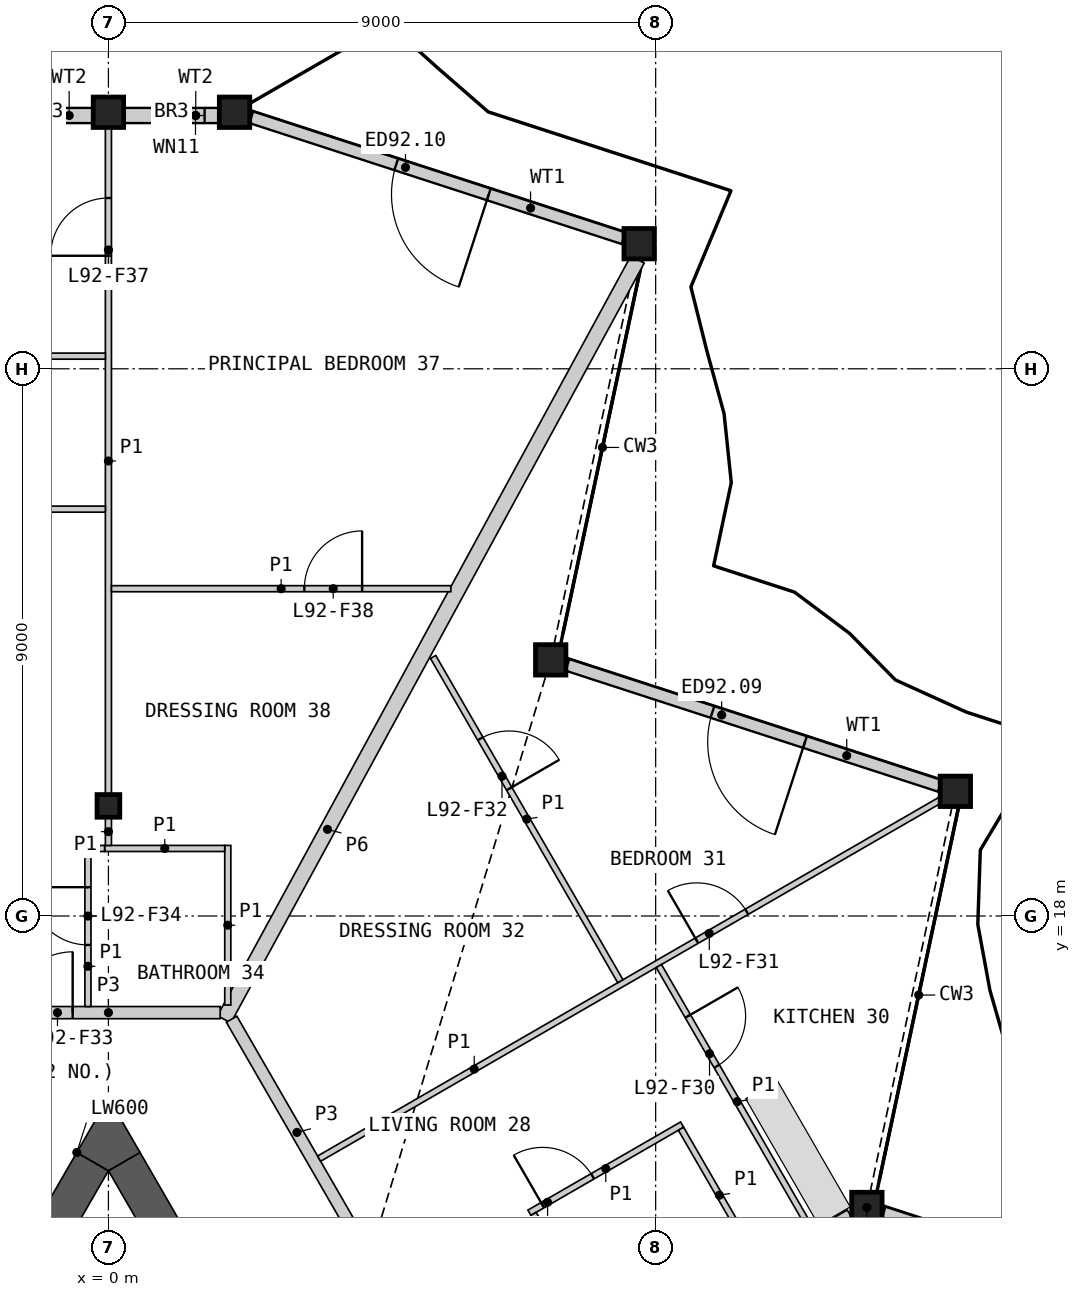
"""IFC4 building model, lengths in metres.
Left out: names, types, materials, properties, quantities, classifications, styles, units other than length and angle.
Written with IfcOpenShell. Run it as: python <this file> out.ifc"""

import sys

from ifc_helpers import new_model, si_unit, direction, frame, frame_2d, origin, origin_2d, place, context, subcontext, project, spatial, polyline, rectangle, hollow_rectangle, i_section, outline, extrude, element, fill, save


model = new_model("IFC4")
c1 = context("Model", 3, precision=1e-05, world=origin(), true_north=direction((0.0, 1.0)))
c2 = subcontext(c1, "Body", "Model", "MODEL_VIEW")
j1 = project(units=[si_unit("LENGTHUNIT", "METRE"), si_unit("PLANEANGLEUNIT", "RADIAN")], contexts=[c1])
p1 = place(None, origin())
s1 = spatial("IfcSite", under=j1, at=p1, CompositionType="ELEMENT")
p2 = place(p1, origin())
s2 = spatial("IfcBuilding", under=s1, at=p2, CompositionType="ELEMENT")
p3 = place(p2, frame((0.0, 0.0, 401.8)))
s3 = spatial("IfcBuildingStorey", under=s2, at=p3, CompositionType="ELEMENT", Elevation=401.8)
for number, where, z_axis, x_axis in (
    (1, (12.474, 13.206, 0.0), (0.0, 0.0, 1.0), (1.0, 0.0, 0.0)),
    (2, (13.929, 20.051, 0.0), (0.0, 0.0, 1.0), (1.0, 0.0, 0.0)),
    (3, (7.274, 22.213, 0.0), (0.0, 0.0, 1.0), (1.0, 0.0, 0.0)),
    (4, (8.729, 29.057, 0.0), (0.0, 0.0, 1.0), (1.0, 0.0, 0.0)),
    (5, (2.074, 31.219, 0.0), (0.0, 0.0, 1.0), (1.0, 0.0, 0.0)),
    (6, (0.0, 31.219, 0.0), (0.0, 0.0, 1.0), (1.0, 0.0, 0.0)),
):
    element("IfcColumn", number, at=place(p3, frame(where, z_axis=z_axis, x_axis=x_axis)), inside=s3, PredefinedType="COLUMN", context=c2, shape_type="SweptSolid", body=[
        extrude(hollow_rectangle(XDim=0.5, YDim=0.5, WallThickness=0.03, at=origin_2d()), origin(), (0.0, 0.0, 1.0), 3.4),
    ])
p4 = place(p3, frame((0.0, 19.811, 0.0), z_axis=(0.0, 0.0, 1.0), x_axis=(1.0, 0.0, 0.0)))
e7 = element("IfcColumn", 7, at=p4, inside=s3, PredefinedType="COLUMN", context=c2, shape_type="SweptSolid", body=[
    extrude(i_section(OverallWidth=0.374, OverallDepth=0.372, WebThickness=0.016, FlangeThickness=0.026, at=origin_2d()), origin(), (0.0, 0.0, 1.0), 3.4),
])
p5 = place(p3, frame((18.874, 11.134, 0.0), z_axis=(0.0, 0.0, 1.0), x_axis=(-0.951063037463, 0.308996923563, 0.0)))
e8 = element("IfcWall", 8, at=p5, inside=s3, PredefinedType="SOLIDWALL", context=c2, shape_type="SweptSolid", body=[
    extrude(rectangle(XDim=6.44, YDim=0.2, at=frame_2d((3.22, 0.0))), origin(), (0.0, 0.0, 1.0), 2.634),
])
p6 = place(p5, frame((2.333, 0.0, 0.0)))
e9 = element("IfcOpeningElement", 9, at=p6, cuts=e8, PredefinedType="OPENING", context=c2, shape_type="SweptSolid", body=[
    extrude(rectangle(XDim=1.6, YDim=2.25, at=frame_2d((0.8, 1.125))), frame((0.0, 0.11, 0.0), z_axis=(0.0, -1.0, 0.0), x_axis=(1.0, 0.0, 0.0)), (0.0, 0.0, 1.0), 0.22),
])
p7 = place(p3, frame((13.674, 20.14, 0.0), z_axis=(0.0, 0.0, 1.0), x_axis=(-0.951051896423, 0.309031212518, 0.0)))
e10 = element("IfcWall", 10, at=p7, inside=s3, PredefinedType="SOLIDWALL", context=c2, shape_type="SweptSolid", body=[
    extrude(rectangle(XDim=6.44, YDim=0.2, at=frame_2d((3.22, 0.0))), origin(), (0.0, 0.0, 1.0), 2.634),
])
p8 = place(p7, frame((2.333, 0.0, 0.0)))
e11 = element("IfcOpeningElement", 11, at=p8, cuts=e10, PredefinedType="OPENING", context=c2, shape_type="SweptSolid", body=[
    extrude(rectangle(XDim=1.6, YDim=2.25, at=frame_2d((0.8, 1.125))), frame((0.0, 0.11, 0.0), z_axis=(0.0, -1.0, 0.0), x_axis=(1.0, 0.0, 0.0)), (0.0, 0.0, 1.0), 0.22),
])
p9 = place(p3, frame((8.474, 29.147, 0.0), z_axis=(0.0, 0.0, 1.0), x_axis=(-0.951051896423, 0.309031212518, 0.0)))
e12 = element("IfcWall", 12, at=p9, inside=s3, PredefinedType="SOLIDWALL", context=c2, shape_type="SweptSolid", body=[
    extrude(rectangle(XDim=6.44, YDim=0.2, at=frame_2d((3.22, 0.0))), origin(), (0.0, 0.0, 1.0), 2.634),
])
p10 = place(p9, frame((2.333, 0.0, 0.0)))
e13 = element("IfcOpeningElement", 13, at=p10, cuts=e12, PredefinedType="OPENING", context=c2, shape_type="SweptSolid", body=[
    extrude(rectangle(XDim=1.6, YDim=2.25, at=frame_2d((0.8, 1.125))), frame((0.0, 0.11, 0.0), z_axis=(0.0, -1.0, 0.0), x_axis=(1.0, 0.0, 0.0)), (0.0, 0.0, 1.0), 0.22),
])
p11 = place(p3, frame((1.832, 31.166, 0.0), z_axis=(0.0, 0.0, 1.0), x_axis=(-1.0, 0.0, 0.0)))
e14 = element("IfcWall", 14, at=p11, inside=s3, PredefinedType="SOLIDWALL", context=c2, shape_type="SweptSolid", body=[
    extrude(rectangle(XDim=1.582, YDim=0.25, at=frame_2d((0.791, 0.0))), origin(), (0.0, 0.0, 1.0), 2.634),
])
p12 = place(p11, frame((0.25, 0.0, 1.7)))
e15 = element("IfcOpeningElement", 15, at=p12, cuts=e14, PredefinedType="OPENING", context=c2, shape_type="SweptSolid", body=[
    extrude(rectangle(XDim=0.6, YDim=0.7, at=frame_2d((0.3, 0.35))), frame((0.0, 0.135, 0.0), z_axis=(0.0, -1.0, 0.0), x_axis=(1.0, 0.0, 0.0)), (0.0, 0.0, 1.0), 0.27),
])
p13 = place(p3, frame((-0.25, 31.166, 0.0), z_axis=(0.0, 0.0, 1.0), x_axis=(-1.0, 0.0, 0.0)))
e16 = element("IfcWall", 16, at=p13, inside=s3, PredefinedType="SOLIDWALL", context=c2, shape_type="SweptSolid", body=[
    extrude(rectangle(XDim=1.582, YDim=0.25, at=frame_2d((0.791, 0.0))), origin(), (0.0, 0.0, 1.0), 2.634),
])
p14 = place(p3, frame((8.686, -0.634, 0.0), z_axis=(0.0, 0.0, 1.0), x_axis=(-0.500004601921, 0.866022746848, 0.0)))
e17 = element("IfcWall", 17, at=p14, inside=s3, PredefinedType="SHEAR", context=c2, shape_type="SweptSolid", body=[
    extrude(rectangle(XDim=16.853, YDim=0.6, at=frame_2d((8.426, 0.0))), origin(), (0.0, 0.0, 1.0), 3.1),
])
p15 = place(p3, frame((-0.26, 13.961, 0.0), z_axis=(0.0, 0.0, 1.0), x_axis=(-0.50000604952, -0.866021911064, 0.0)))
e18 = element("IfcWall", 18, at=p15, inside=s3, PredefinedType="SHEAR", context=c2, shape_type="SweptSolid", body=[
    extrude(rectangle(XDim=4.869, YDim=0.6, at=frame_2d((2.434, 0.0))), origin(), (0.0, 0.0, 1.0), 3.1),
])
p16 = place(p3, origin())
e19 = element("IfcWall", 19, at=p16, inside=s3, PredefinedType="SHEAR", context=c2, shape_type="SweptSolid", body=[
    extrude(outline(polyline([(-0.52, 14.111), (0.0, 15.011), (0.52, 14.111), (0.0, 13.811), (-0.52, 14.111)])), origin(), (0.0, 0.0, 1.0), 3.1),
])
p17 = place(p3, frame((1.903, 16.301, 0.0), z_axis=(0.0, 0.0, 1.0), x_axis=(0.47791275145, 0.878407309852, 0.0)))
e20 = element("IfcWall", 20, at=p17, inside=s3, PredefinedType="PARTITIONING", context=c2, shape_type="SweptSolid", body=[
    extrude(rectangle(XDim=14.226, YDim=0.25, at=frame_2d((7.113, 0.0))), origin(), (0.0, 0.0, 1.0), 2.33),
])
p18 = place(p3, frame((6.065, 9.506, 0.0), z_axis=(0.0, 0.0, 1.0), x_axis=(0.866018949465, 0.500011179042, 0.0)))
e21 = element("IfcWall", 21, at=p18, inside=s3, PredefinedType="PARTITIONING", context=c2, shape_type="SweptSolid", body=[
    extrude(rectangle(XDim=7.1, YDim=0.25, at=frame_2d((3.55, 0.0))), origin(), (0.0, 0.0, 1.0), 2.33),
])
p19 = place(p3, frame((2.025, 16.303, 0.0), z_axis=(0.0, 0.0, 1.0), x_axis=(0.500004215162, -0.866022970146, 0.0)))
e22 = element("IfcWall", 22, at=p19, inside=s3, PredefinedType="PARTITIONING", context=c2, shape_type="SweptSolid", body=[
    extrude(rectangle(XDim=4.3, YDim=0.2, at=frame_2d((2.15, 0.0))), origin(), (0.0, 0.0, 1.0), 3.1),
])
p20 = place(p3, frame((-1.838, 16.411, 0.0), z_axis=(0.0, 0.0, 1.0), x_axis=(1.0, 0.0, 0.0)))
e23 = element("IfcWall", 23, at=p20, inside=s3, PredefinedType="PARTITIONING", context=c2, shape_type="SweptSolid", body=[
    extrude(rectangle(XDim=3.676, YDim=0.2, at=frame_2d((1.838, 0.0))), origin(), (0.0, 0.0, 1.0), 3.1),
])
p21 = place(p20, frame((0.25, 0.0, 0.0)))
e24 = element("IfcOpeningElement", 24, at=p21, cuts=e23, PredefinedType="OPENING", context=c2, shape_type="SweptSolid", body=[
    extrude(rectangle(XDim=1.0, YDim=2.1, at=frame_2d((0.5, 1.05))), frame((0.0, 0.11, 0.0), z_axis=(0.0, -1.0, 0.0), x_axis=(1.0, 0.0, 0.0)), (0.0, 0.0, 1.0), 0.22),
])
p22 = place(p3, frame((3.465, 14.01, 0.0), z_axis=(0.0, 0.0, 1.0), x_axis=(0.866032376801, 0.499987922186, 0.0)))
e25 = element("IfcWall", 25, at=p22, inside=s3, PredefinedType="PARTITIONING", context=c2, shape_type="SweptSolid", body=[
    extrude(rectangle(XDim=11.782, YDim=0.1, at=frame_2d((5.891, 0.0))), origin(), (0.0, 0.0, 1.0), 2.33),
])
p23 = place(p22, frame((7.171, 0.0, 0.0)))
e26 = element("IfcOpeningElement", 26, at=p23, cuts=e25, PredefinedType="OPENING", context=c2, shape_type="SweptSolid", body=[
    extrude(rectangle(XDim=0.95, YDim=2.1, at=frame_2d((0.475, 1.05))), frame((0.0, 0.06, 0.0), z_axis=(0.0, -1.0, 0.0), x_axis=(1.0, 0.0, 0.0)), (0.0, 0.0, 1.0), 0.12),
])
p24 = place(p3, frame((0.0, 20.008, 0.0), z_axis=(0.0, 0.0, 1.0), x_axis=(0.0, 1.0, 0.0)))
e27 = element("IfcWall", 27, at=p24, inside=s3, PredefinedType="PARTITIONING", context=c2, shape_type="SweptSolid", body=[
    extrude(rectangle(XDim=10.951, YDim=0.1, at=frame_2d((5.476, 0.0))), origin(), (0.0, 0.0, 1.0), 2.33),
])
p25 = place(p24, frame((8.851, 0.0, 0.0)))
e28 = element("IfcOpeningElement", 28, at=p25, cuts=e27, PredefinedType="OPENING", context=c2, shape_type="SweptSolid", body=[
    extrude(rectangle(XDim=0.95, YDim=2.1, at=frame_2d((0.475, 1.05))), frame((0.0, 0.06, 0.0), z_axis=(0.0, -1.0, 0.0), x_axis=(1.0, 0.0, 0.0)), (0.0, 0.0, 1.0), 0.12),
])
p26 = place(p3, frame((9.052, 17.177, 0.0), z_axis=(0.0, 0.0, 1.0), x_axis=(0.499998765615, -0.866026116456, 0.0)))
e29 = element("IfcWall", 29, at=p26, inside=s3, PredefinedType="PARTITIONING", context=c2, shape_type="SweptSolid", body=[
    extrude(rectangle(XDim=10.3, YDim=0.1, at=frame_2d((5.15, 0.0))), origin(), (0.0, 0.0, 1.0), 2.33),
])
p27 = place(p26, frame((7.089, 0.0, 0.0)))
e30 = element("IfcOpeningElement", 30, at=p27, cuts=e29, PredefinedType="OPENING", context=c2, shape_type="SweptSolid", body=[
    extrude(rectangle(XDim=0.95, YDim=2.1, at=frame_2d((0.475, 1.05))), frame((0.0, 0.06, 0.0), z_axis=(0.0, -1.0, 0.0), x_axis=(1.0, 0.0, 0.0)), (0.0, 0.0, 1.0), 0.12),
])
p28 = place(p26, frame((0.954, 0.0, 0.0)))
e31 = element("IfcOpeningElement", 31, at=p28, cuts=e29, PredefinedType="OPENING", context=c2, shape_type="SweptSolid", body=[
    extrude(rectangle(XDim=0.95, YDim=2.1, at=frame_2d((0.475, 1.05))), frame((0.0, 0.06, 0.0), z_axis=(0.0, -1.0, 0.0), x_axis=(1.0, 0.0, 0.0)), (0.0, 0.0, 1.0), 0.12),
])
p29 = place(p3, frame((-7.712, 27.208, 0.0), z_axis=(0.0, 0.0, 1.0), x_axis=(1.0, 0.0, 0.0)))
e32 = element("IfcWall", 32, at=p29, inside=s3, PredefinedType="PARTITIONING", context=c2, shape_type="SweptSolid", body=[
    extrude(rectangle(XDim=7.662, YDim=0.1, at=frame_2d((3.831, 0.0))), origin(), (0.0, 0.0, 1.0), 2.33),
])
p30 = place(p29, frame((3.657, 0.0, 0.0)))
e33 = element("IfcOpeningElement", 33, at=p30, cuts=e32, PredefinedType="OPENING", context=c2, shape_type="SweptSolid", body=[
    extrude(rectangle(XDim=0.95, YDim=2.1, at=frame_2d((0.475, 1.05))), frame((0.0, 0.06, 0.0), z_axis=(0.0, -1.0, 0.0), x_axis=(1.0, 0.0, 0.0)), (0.0, 0.0, 1.0), 0.12),
])
p31 = place(p3, frame((-6.343, 24.692, 0.0), z_axis=(0.0, 0.0, 1.0), x_axis=(1.0, 0.0, 0.0)))
e34 = element("IfcWall", 34, at=p31, inside=s3, PredefinedType="PARTITIONING", context=c2, shape_type="SweptSolid", body=[
    extrude(rectangle(XDim=6.293, YDim=0.1, at=frame_2d((3.146, 0.0))), origin(), (0.0, 0.0, 1.0), 2.33),
])
p32 = place(p31, frame((3.378, 0.0, 0.0)))
e35 = element("IfcOpeningElement", 35, at=p32, cuts=e34, PredefinedType="OPENING", context=c2, shape_type="SweptSolid", body=[
    extrude(rectangle(XDim=0.95, YDim=2.1, at=frame_2d((0.475, 1.05))), frame((0.0, 0.06, 0.0), z_axis=(0.0, -1.0, 0.0), x_axis=(1.0, 0.0, 0.0)), (0.0, 0.0, 1.0), 0.12),
])
p33 = place(p3, frame((5.34, 22.26, 0.0), z_axis=(0.0, 0.0, 1.0), x_axis=(0.500027893485, -0.866009298874, 0.0)))
e36 = element("IfcWall", 36, at=p33, inside=s3, PredefinedType="PARTITIONING", context=c2, shape_type="SweptSolid", body=[
    extrude(rectangle(XDim=6.158, YDim=0.1, at=frame_2d((3.079, 0.0))), origin(), (0.0, 0.0, 1.0), 2.33),
])
p34 = place(p33, frame((1.552, 0.0, 0.0)))
e37 = element("IfcOpeningElement", 37, at=p34, cuts=e36, PredefinedType="OPENING", context=c2, shape_type="SweptSolid", body=[
    extrude(rectangle(XDim=0.95, YDim=2.1, at=frame_2d((0.475, 1.05))), frame((0.0, 0.06, 0.0), z_axis=(0.0, -1.0, 0.0), x_axis=(1.0, 0.0, 0.0)), (0.0, 0.0, 1.0), 0.12),
])
p35 = place(p3, frame((0.05, 23.383, 0.0), z_axis=(0.0, 0.0, 1.0), x_axis=(1.0, 0.0, 0.0)))
e38 = element("IfcWall", 38, at=p35, inside=s3, PredefinedType="PARTITIONING", context=c2, shape_type="SweptSolid", body=[
    extrude(rectangle(XDim=5.581, YDim=0.1, at=frame_2d((2.791, 0.0))), origin(), (0.0, 0.0, 1.0), 2.33),
])
p36 = place(p35, frame((3.172, 0.0, 0.0)))
e39 = element("IfcOpeningElement", 39, at=p36, cuts=e38, PredefinedType="OPENING", context=c2, shape_type="SweptSolid", body=[
    extrude(rectangle(XDim=0.95, YDim=2.1, at=frame_2d((0.475, 1.05))), frame((0.0, 0.06, 0.0), z_axis=(0.0, -1.0, 0.0), x_axis=(1.0, 0.0, 0.0)), (0.0, 0.0, 1.0), 0.12),
])
p37 = place(p3, frame((6.923, 13.119, 0.0), z_axis=(0.0, 0.0, 1.0), x_axis=(0.866032775405, 0.499987231761, 0.0)))
e40 = element("IfcWall", 40, at=p37, inside=s3, PredefinedType="PARTITIONING", context=c2, shape_type="SweptSolid", body=[
    extrude(rectangle(XDim=2.9, YDim=0.1, at=frame_2d((1.45, 0.0))), origin(), (0.0, 0.0, 1.0), 2.33),
])
p38 = place(p37, frame((0.25, 0.0, 0.0)))
e41 = element("IfcOpeningElement", 41, at=p38, cuts=e40, PredefinedType="OPENING", context=c2, shape_type="SweptSolid", body=[
    extrude(rectangle(XDim=0.95, YDim=2.1, at=frame_2d((0.475, 1.05))), frame((0.0, 0.06, 0.0), z_axis=(0.0, -1.0, 0.0), x_axis=(1.0, 0.0, 0.0)), (0.0, 0.0, 1.0), 0.12),
])
p39 = place(p3, frame((1.963, 16.536, 0.0), z_axis=(0.0, 0.0, 1.0), x_axis=(0.0, 1.0, 0.0)))
e42 = element("IfcWall", 42, at=p39, inside=s3, PredefinedType="PARTITIONING", context=c2, shape_type="SweptSolid", body=[
    extrude(rectangle(XDim=2.625, YDim=0.1, at=frame_2d((1.312, 0.0))), origin(), (0.0, 0.0, 1.0), 2.33),
])
p40 = place(p3, frame((9.417, 14.501, 0.0), z_axis=(0.0, 0.0, 1.0), x_axis=(0.500048846702, -0.865997200291, 0.0)))
e43 = element("IfcWall", 43, at=p40, inside=s3, PredefinedType="PARTITIONING", context=c2, shape_type="SweptSolid", body=[
    extrude(rectangle(XDim=2.525, YDim=0.1, at=frame_2d((1.263, 0.0))), origin(), (0.0, 0.0, 1.0), 2.33),
])
p41 = place(p3, frame((6.992, 13.101, 0.0), z_axis=(0.0, 0.0, 1.0), x_axis=(0.499976333282, -0.866039067339, 0.0)))
e44 = element("IfcWall", 44, at=p41, inside=s3, PredefinedType="PARTITIONING", context=c2, shape_type="SweptSolid", body=[
    extrude(rectangle(XDim=2.525, YDim=0.1, at=frame_2d((1.262, 0.0))), origin(), (0.0, 0.0, 1.0), 2.33),
])
p42 = place(p3, frame((-0.337, 16.511, 0.0), z_axis=(0.0, 0.0, 1.0), x_axis=(0.0, 1.0, 0.0)))
e45 = element("IfcWall", 45, at=p42, inside=s3, PredefinedType="PARTITIONING", context=c2, shape_type="SweptSolid", body=[
    extrude(rectangle(XDim=2.649, YDim=0.1, at=frame_2d((1.325, 0.0))), origin(), (0.0, 0.0, 1.0), 2.33),
])
p43 = place(p42, frame((1.013, 0.0, 0.0)))
e46 = element("IfcOpeningElement", 46, at=p43, cuts=e45, PredefinedType="OPENING", context=c2, shape_type="SweptSolid", body=[
    extrude(rectangle(XDim=0.95, YDim=2.1, at=frame_2d((0.475, 1.05))), frame((0.0, 0.06, 0.0), z_axis=(0.0, -1.0, 0.0), x_axis=(1.0, 0.0, 0.0)), (0.0, 0.0, 1.0), 0.12),
])
p44 = place(p3, frame((-0.06, 19.111, 0.0), z_axis=(0.0, 0.0, 1.0), x_axis=(1.0, 0.0, 0.0)))
e47 = element("IfcWall", 47, at=p44, inside=s3, PredefinedType="PARTITIONING", context=c2, shape_type="SweptSolid", body=[
    extrude(rectangle(XDim=1.973, YDim=0.1, at=frame_2d((0.987, 0.0))), origin(), (0.0, 0.0, 1.0), 2.33),
])
p45 = place(p3, frame((0.0, 19.161, 0.0), z_axis=(0.0, 0.0, 1.0), x_axis=(0.0, 1.0, 0.0)))
e48 = element("IfcWall", 48, at=p45, inside=s3, PredefinedType="PARTITIONING", context=c2, shape_type="SweptSolid", body=[
    extrude(rectangle(XDim=0.453, YDim=0.1, at=frame_2d((0.227, 0.0))), origin(), (0.0, 0.0, 1.0), 2.33),
])
p46 = place(p3, frame((-0.287, 19.11, 0.0), z_axis=(0.0, 0.0, 1.0), x_axis=(0.999997637059, 0.002173907907, 0.0)))
e49 = element("IfcWall", 49, at=p46, inside=s3, PredefinedType="PARTITIONING", context=c2, shape_type="SweptSolid", body=[
    extrude(rectangle(XDim=0.225, YDim=0.1, at=frame_2d((0.112, 0.0))), origin(), (0.0, 0.0, 1.0), 2.33),
])
p47 = place(p8, origin())
e50 = element("IfcDoor", 50, at=p47, inside=s3, OperationType="DOUBLE_DOOR_SINGLE_SWING", PredefinedType="DOOR", context=c2, shape_type="SweptSolid", body=[
    extrude(rectangle(XDim=1.6, YDim=2.25, at=frame_2d((0.8, 1.125))), frame((0.0, 0.025, 0.0), z_axis=(0.0, -1.0, 0.0), x_axis=(1.0, 0.0, 0.0)), (0.0, 0.0, 1.0), 0.05),
])
fill(e11, e50)
p48 = place(p10, origin())
e51 = element("IfcDoor", 51, at=p48, inside=s3, OperationType="DOUBLE_DOOR_SINGLE_SWING", PredefinedType="DOOR", context=c2, shape_type="SweptSolid", body=[
    extrude(rectangle(XDim=1.6, YDim=2.25, at=frame_2d((0.8, 1.125))), frame((0.0, 0.025, 0.0), z_axis=(0.0, -1.0, 0.0), x_axis=(1.0, 0.0, 0.0)), (0.0, 0.0, 1.0), 0.05),
])
fill(e13, e51)
p49 = place(p12, origin())
e52 = element("IfcWindow", 52, at=p49, inside=s3, PartitioningType="SINGLE_PANEL", PredefinedType="WINDOW", context=c2, shape_type="SweptSolid", body=[
    extrude(rectangle(XDim=0.6, YDim=0.7, at=frame_2d((0.3, 0.35))), frame((0.0, 0.03, 0.0), z_axis=(0.0, -1.0, 0.0), x_axis=(1.0, 0.0, 0.0)), (0.0, 0.0, 1.0), 0.06),
])
fill(e15, e52)
p50 = place(p38, origin())
e53 = element("IfcDoor", 53, at=p50, inside=s3, OperationType="SINGLE_SWING_LEFT", PredefinedType="DOOR", context=c2, shape_type="SweptSolid", body=[
    extrude(rectangle(XDim=0.95, YDim=2.1, at=frame_2d((0.475, 1.05))), frame((0.0, 0.025, 0.0), z_axis=(0.0, -1.0, 0.0), x_axis=(1.0, 0.0, 0.0)), (0.0, 0.0, 1.0), 0.05),
])
fill(e41, e53)
p51 = place(p28, origin())
e54 = element("IfcDoor", 54, at=p51, inside=s3, OperationType="SINGLE_SWING_LEFT", PredefinedType="DOOR", context=c2, shape_type="SweptSolid", body=[
    extrude(rectangle(XDim=0.95, YDim=2.1, at=frame_2d((0.475, 1.05))), frame((0.0, 0.025, 0.0), z_axis=(0.0, -1.0, 0.0), x_axis=(1.0, 0.0, 0.0)), (0.0, 0.0, 1.0), 0.05),
])
fill(e31, e54)
p52 = place(p23, origin())
e55 = element("IfcDoor", 55, at=p52, inside=s3, OperationType="SINGLE_SWING_LEFT", PredefinedType="DOOR", context=c2, shape_type="SweptSolid", body=[
    extrude(rectangle(XDim=0.95, YDim=2.1, at=frame_2d((0.475, 1.05))), frame((0.0, 0.025, 0.0), z_axis=(0.0, -1.0, 0.0), x_axis=(1.0, 0.0, 0.0)), (0.0, 0.0, 1.0), 0.05),
])
fill(e26, e55)
p53 = place(p34, origin())
e56 = element("IfcDoor", 56, at=p53, inside=s3, OperationType="SINGLE_SWING_RIGHT", PredefinedType="DOOR", context=c2, shape_type="SweptSolid", body=[
    extrude(rectangle(XDim=0.95, YDim=2.1, at=frame_2d((0.475, 1.05))), frame((0.0, 0.025, 0.0), z_axis=(0.0, -1.0, 0.0), x_axis=(1.0, 0.0, 0.0)), (0.0, 0.0, 1.0), 0.05),
])
fill(e37, e56)
p54 = place(p21, origin())
e57 = element("IfcDoor", 57, at=p54, inside=s3, OperationType="SINGLE_SWING_RIGHT", PredefinedType="DOOR", context=c2, shape_type="SweptSolid", body=[
    extrude(rectangle(XDim=1.0, YDim=2.1, at=frame_2d((0.5, 1.05))), frame((0.0, 0.025, 0.0), z_axis=(0.0, -1.0, 0.0), x_axis=(1.0, 0.0, 0.0)), (0.0, 0.0, 1.0), 0.05),
])
fill(e24, e57)
p55 = place(p43, origin())
e58 = element("IfcDoor", 58, at=p55, inside=s3, OperationType="SINGLE_SWING_RIGHT", PredefinedType="DOOR", context=c2, shape_type="SweptSolid", body=[
    extrude(rectangle(XDim=0.95, YDim=2.1, at=frame_2d((0.475, 1.05))), frame((0.0, 0.025, 0.0), z_axis=(0.0, -1.0, 0.0), x_axis=(1.0, 0.0, 0.0)), (0.0, 0.0, 1.0), 0.05),
])
fill(e46, e58)
p56 = place(p25, origin())
e59 = element("IfcDoor", 59, at=p56, inside=s3, OperationType="SINGLE_SWING_LEFT", PredefinedType="DOOR", context=c2, shape_type="SweptSolid", body=[
    extrude(rectangle(XDim=0.95, YDim=2.1, at=frame_2d((0.475, 1.05))), frame((0.0, 0.025, 0.0), z_axis=(0.0, -1.0, 0.0), x_axis=(1.0, 0.0, 0.0)), (0.0, 0.0, 1.0), 0.05),
])
fill(e28, e59)
p57 = place(p36, origin())
e60 = element("IfcDoor", 60, at=p57, inside=s3, OperationType="SINGLE_SWING_RIGHT", PredefinedType="DOOR", context=c2, shape_type="SweptSolid", body=[
    extrude(rectangle(XDim=0.95, YDim=2.1, at=frame_2d((0.475, 1.05))), frame((0.0, 0.025, 0.0), z_axis=(0.0, -1.0, 0.0), x_axis=(1.0, 0.0, 0.0)), (0.0, 0.0, 1.0), 0.05),
])
fill(e39, e60)
save(model, sys.argv[1])
